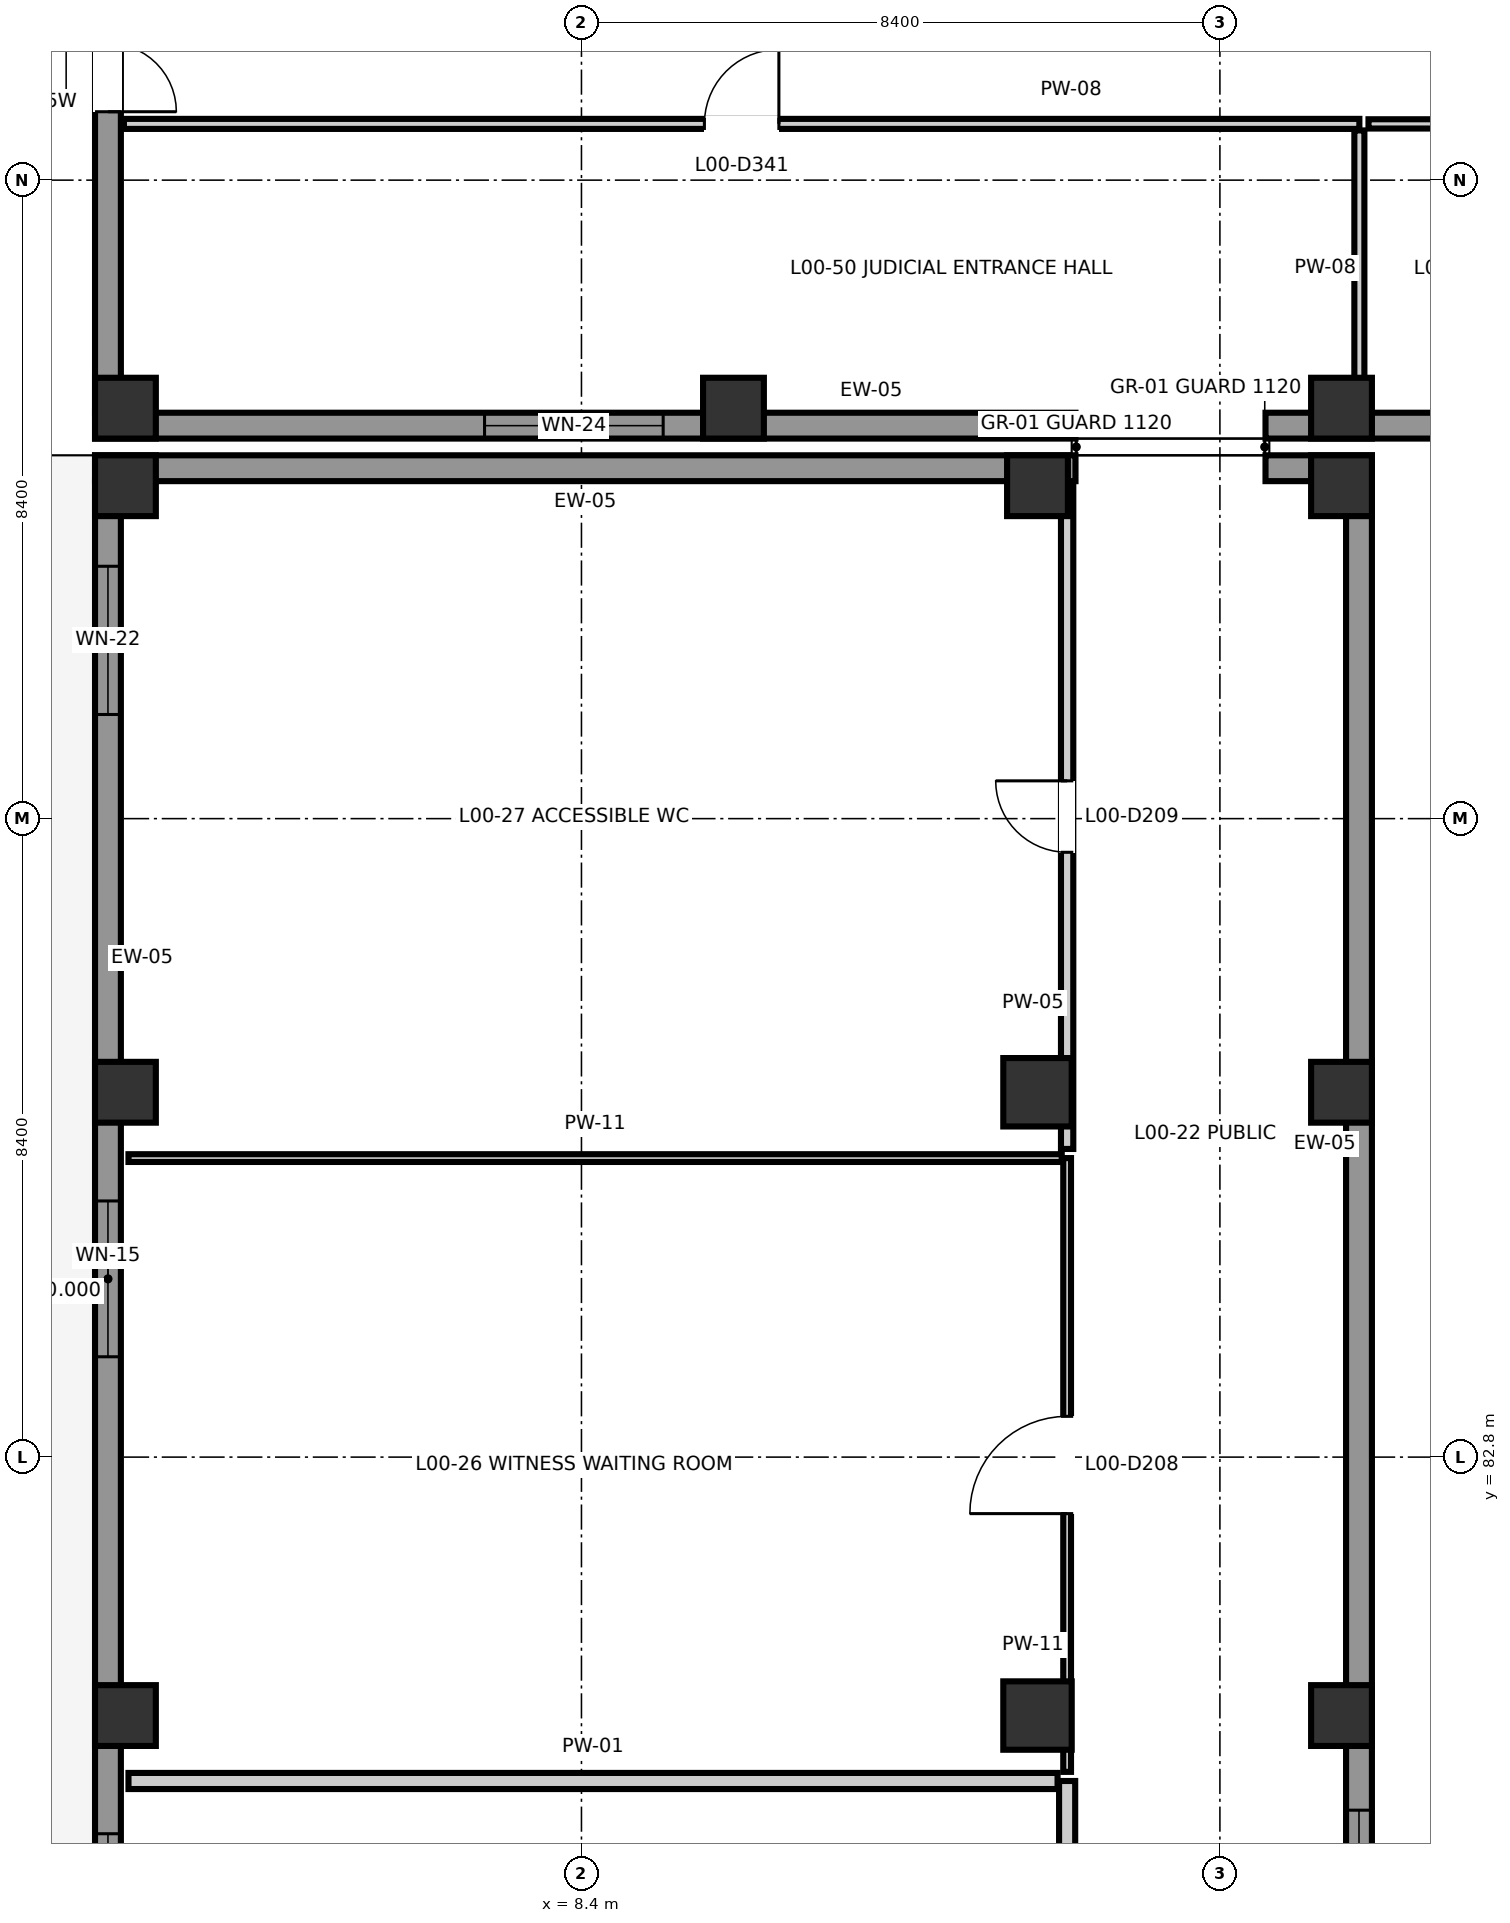
"""IFC4 building model, lengths in metres.
Left out: names, types, materials, properties, quantities, classifications, styles, units other than length and angle.
Written with IfcOpenShell. Run it as: python <this file> out.ifc"""

import sys

from ifc_helpers import new_model, si_unit, direction, frame, frame_2d, origin, origin_2d, place, context, subcontext, project, spatial, rectangle, extrude, element, fill, save


model = new_model("IFC4")
c1 = context("Model", 3, precision=1e-05, world=origin(), true_north=direction((0.0, 1.0)))
c2 = subcontext(c1, "Body", "Model", "MODEL_VIEW")
j1 = project(units=[si_unit("LENGTHUNIT", "METRE"), si_unit("PLANEANGLEUNIT", "RADIAN")], contexts=[c1])
p1 = place(None, origin())
s1 = spatial("IfcSite", under=j1, at=p1, CompositionType="ELEMENT")
p2 = place(p1, origin())
s2 = spatial("IfcBuilding", under=s1, at=p2, CompositionType="ELEMENT")
p3 = place(p2, origin())
s3 = spatial("IfcBuildingStorey", under=s2, at=p3, CompositionType="ELEMENT", Elevation=0.0)
for number, where, z_axis, x_axis in (
    (1, (2.4, 79.4, 0.0), (0.0, 0.0, 1.0), (1.0, 0.0, 0.0)),
    (2, (2.4, 87.6, 0.0), (0.0, 0.0, 1.0), (1.0, 0.0, 0.0)),
    (3, (2.4, 95.58, 0.0), (0.0, 0.0, 1.0), (1.0, 0.0, 0.0)),
):
    element("IfcColumn", number, at=place(p3, frame(where, z_axis=z_axis, x_axis=x_axis)), inside=s3, PredefinedType="COLUMN", context=c2, shape_type="SweptSolid", body=[
        extrude(rectangle(XDim=0.8, YDim=0.8, at=origin_2d()), origin(), (0.0, 0.0, 1.0), 5.4),
    ])
for number, where, z_axis, x_axis in (
    (4, (14.4, 79.4, 0.0), (0.0, 0.0, 1.0), (1.0, 0.0, 0.0)),
    (5, (14.4, 87.6, 0.0), (0.0, 0.0, 1.0), (1.0, 0.0, 0.0)),
):
    element("IfcColumn", number, at=place(p3, frame(where, z_axis=z_axis, x_axis=x_axis)), inside=s3, PredefinedType="COLUMN", context=c2, shape_type="SweptSolid", body=[
        extrude(rectangle(XDim=0.9, YDim=0.9, at=origin_2d()), origin(), (0.0, 0.0, 1.0), 5.4),
    ])
for number, where, z_axis, x_axis in (
    (6, (14.4, 95.58, 0.0), (0.0, 0.0, 1.0), (1.0, 0.0, 0.0)),
    (7, (18.4, 79.4, 0.0), (0.0, 0.0, 1.0), (1.0, 0.0, 0.0)),
    (8, (18.4, 87.6, 0.0), (0.0, 0.0, 1.0), (1.0, 0.0, 0.0)),
    (9, (18.4, 95.58, 0.0), (0.0, 0.0, 1.0), (1.0, 0.0, 0.0)),
    (10, (2.4, 96.6, 0.0), (0.0, 0.0, 1.0), (1.0, 0.0, 0.0)),
    (11, (10.4, 96.6, 0.0), (0.0, 0.0, 1.0), (1.0, 0.0, 0.0)),
    (12, (18.4, 96.6, 0.0), (0.0, 0.0, 1.0), (1.0, 0.0, 0.0)),
):
    element("IfcColumn", number, at=place(p3, frame(where, z_axis=z_axis, x_axis=x_axis)), inside=s3, PredefinedType="COLUMN", context=c2, shape_type="SweptSolid", body=[
        extrude(rectangle(XDim=0.8, YDim=0.8, at=origin_2d()), origin(), (0.0, 0.0, 1.0), 5.4),
    ])
p4 = place(p3, frame((18.63, 41.355, 0.0), z_axis=(0.0, 0.0, 1.0), x_axis=(0.0, 1.0, 0.0)))
e13 = element("IfcWall", 13, at=p4, inside=s3, PredefinedType="SOLIDWALL", context=c2, shape_type="SweptSolid", body=[
    extrude(rectangle(XDim=54.29, YDim=0.34, at=frame_2d((27.145, 0.0))), origin(), (0.0, 0.0, 1.0), 5.1),
])
p5 = place(p4, frame((1.175, 0.0, 0.72)))
e14 = element("IfcOpeningElement", 14, at=p5, cuts=e13, PredefinedType="OPENING", context=c2, shape_type="SweptSolid", body=[
    extrude(rectangle(XDim=1.85, YDim=2.15, at=frame_2d((0.925, 1.075))), frame((0.0, 0.185, 0.0), z_axis=(0.0, -1.0, 0.0), x_axis=(1.0, 0.0, 0.0)), (0.0, 0.0, 1.0), 0.37),
])
p6 = place(p4, frame((34.6, 0.0, 0.72)))
e15 = element("IfcOpeningElement", 15, at=p6, cuts=e13, PredefinedType="OPENING", context=c2, shape_type="SweptSolid", body=[
    extrude(rectangle(XDim=2.2, YDim=2.35, at=frame_2d((1.1, 1.175))), frame((0.0, 0.185, 0.0), z_axis=(0.0, -1.0, 0.0), x_axis=(1.0, 0.0, 0.0)), (0.0, 0.0, 1.0), 0.37),
])
p7 = place(p3, frame((18.8, 95.81, 0.0), z_axis=(0.0, 0.0, 1.0), x_axis=(-1.0, 0.0, 0.0)))
e16 = element("IfcWall", 16, at=p7, inside=s3, PredefinedType="SOLIDWALL", context=c2, shape_type="SweptSolid", body=[
    extrude(rectangle(XDim=1.4, YDim=0.34, at=frame_2d((0.7, 0.0))), origin(), (0.0, 0.0, 1.0), 5.1),
])
p8 = place(p3, frame((14.9, 95.81, 0.0), z_axis=(0.0, 0.0, 1.0), x_axis=(-1.0, 0.0, 0.0)))
e17 = element("IfcWall", 17, at=p8, inside=s3, PredefinedType="SOLIDWALL", context=c2, shape_type="SweptSolid", body=[
    extrude(rectangle(XDim=12.9, YDim=0.34, at=frame_2d((6.45, 0.0))), origin(), (0.0, 0.0, 1.0), 5.1),
])
p9 = place(p3, frame((2.17, 95.645, 0.0), z_axis=(0.0, 0.0, 1.0), x_axis=(0.0, -1.0, 0.0)))
e18 = element("IfcWall", 18, at=p9, inside=s3, PredefinedType="SOLIDWALL", context=c2, shape_type="SweptSolid", body=[
    extrude(rectangle(XDim=54.29, YDim=0.34, at=frame_2d((27.145, 0.0))), origin(), (0.0, 0.0, 1.0), 5.1),
])
p10 = place(p9, frame((47.945, 0.0, 0.0)))
e19 = element("IfcOpeningElement", 19, at=p10, cuts=e18, PredefinedType="OPENING", context=c2, shape_type="SweptSolid", body=[
    extrude(rectangle(XDim=1.2, YDim=2.2, at=frame_2d((0.6, 1.1))), frame((0.0, 0.185, 0.0), z_axis=(0.0, -1.0, 0.0), x_axis=(1.0, 0.0, 0.0)), (0.0, 0.0, 1.0), 0.37),
])
p11 = place(p9, frame((1.125, 0.0, 0.72)))
e20 = element("IfcOpeningElement", 20, at=p11, cuts=e18, PredefinedType="OPENING", context=c2, shape_type="SweptSolid", body=[
    extrude(rectangle(XDim=1.95, YDim=1.95, at=frame_2d((0.975, 0.975))), frame((0.0, 0.185, 0.0), z_axis=(0.0, -1.0, 0.0), x_axis=(1.0, 0.0, 0.0)), (0.0, 0.0, 1.0), 0.37),
])
p12 = place(p9, frame((9.475, 0.0, 0.72)))
e21 = element("IfcOpeningElement", 21, at=p12, cuts=e18, PredefinedType="OPENING", context=c2, shape_type="SweptSolid", body=[
    extrude(rectangle(XDim=2.05, YDim=1.75, at=frame_2d((1.025, 0.875))), frame((0.0, 0.185, 0.0), z_axis=(0.0, -1.0, 0.0), x_axis=(1.0, 0.0, 0.0)), (0.0, 0.0, 1.0), 0.37),
])
p13 = place(p9, frame((17.8, 0.0, 0.72)))
e22 = element("IfcOpeningElement", 22, at=p13, cuts=e18, PredefinedType="OPENING", context=c2, shape_type="SweptSolid", body=[
    extrude(rectangle(XDim=2.2, YDim=1.5, at=frame_2d((1.1, 0.75))), frame((0.0, 0.185, 0.0), z_axis=(0.0, -1.0, 0.0), x_axis=(1.0, 0.0, 0.0)), (0.0, 0.0, 1.0), 0.37),
])
p14 = place(p3, frame((2.0, 96.37, 0.0), z_axis=(0.0, 0.0, 1.0), x_axis=(1.0, 0.0, 0.0)))
e23 = element("IfcWall", 23, at=p14, inside=s3, PredefinedType="SOLIDWALL", context=c2, shape_type="SweptSolid", body=[
    extrude(rectangle(XDim=12.9, YDim=0.34, at=frame_2d((6.45, 0.0))), origin(), (0.0, 0.0, 1.0), 5.1),
])
p15 = place(p14, frame((5.125, 0.0, 0.72)))
e24 = element("IfcOpeningElement", 24, at=p15, cuts=e23, PredefinedType="OPENING", context=c2, shape_type="SweptSolid", body=[
    extrude(rectangle(XDim=2.35, YDim=1.95, at=frame_2d((1.175, 0.975))), frame((0.0, 0.185, 0.0), z_axis=(0.0, -1.0, 0.0), x_axis=(1.0, 0.0, 0.0)), (0.0, 0.0, 1.0), 0.37),
])
p16 = place(p3, frame((17.4, 96.37, 0.0), z_axis=(0.0, 0.0, 1.0), x_axis=(1.0, 0.0, 0.0)))
e25 = element("IfcWall", 25, at=p16, inside=s3, PredefinedType="SOLIDWALL", context=c2, shape_type="SweptSolid", body=[
    extrude(rectangle(XDim=49.4, YDim=0.34, at=frame_2d((24.7, 0.0))), origin(), (0.0, 0.0, 1.0), 5.1),
])
p17 = place(p16, frame((5.1, 0.0, 0.72)))
e26 = element("IfcOpeningElement", 26, at=p17, cuts=e25, PredefinedType="OPENING", context=c2, shape_type="SweptSolid", body=[
    extrude(rectangle(XDim=2.4, YDim=2.35, at=frame_2d((1.2, 1.175))), frame((0.0, 0.185, 0.0), z_axis=(0.0, -1.0, 0.0), x_axis=(1.0, 0.0, 0.0)), (0.0, 0.0, 1.0), 0.37),
])
p18 = place(p16, frame((22.525, 0.0, 0.72)))
e27 = element("IfcOpeningElement", 27, at=p18, cuts=e25, PredefinedType="OPENING", context=c2, shape_type="SweptSolid", body=[
    extrude(rectangle(XDim=1.15, YDim=1.75, at=frame_2d((0.575, 0.875))), frame((0.0, 0.185, 0.0), z_axis=(0.0, -1.0, 0.0), x_axis=(1.0, 0.0, 0.0)), (0.0, 0.0, 1.0), 0.37),
])
p19 = place(p16, frame((30.875, 0.0, 0.72)))
e28 = element("IfcOpeningElement", 28, at=p19, cuts=e25, PredefinedType="OPENING", context=c2, shape_type="SweptSolid", body=[
    extrude(rectangle(XDim=1.25, YDim=2.15, at=frame_2d((0.625, 1.075))), frame((0.0, 0.185, 0.0), z_axis=(0.0, -1.0, 0.0), x_axis=(1.0, 0.0, 0.0)), (0.0, 0.0, 1.0), 0.37),
])
p20 = place(p16, frame((43.4, 0.0, 0.72)))
e29 = element("IfcOpeningElement", 29, at=p20, cuts=e25, PredefinedType="OPENING", context=c2, shape_type="SweptSolid", body=[
    extrude(rectangle(XDim=1.4, YDim=2.15, at=frame_2d((0.7, 1.075))), frame((0.0, 0.185, 0.0), z_axis=(0.0, -1.0, 0.0), x_axis=(1.0, 0.0, 0.0)), (0.0, 0.0, 1.0), 0.37),
])
p21 = place(p3, frame((2.17, 112.665, 0.0), z_axis=(0.0, 0.0, 1.0), x_axis=(0.0, -1.0, 0.0)))
e30 = element("IfcWall", 30, at=p21, inside=s3, PredefinedType="SOLIDWALL", context=c2, shape_type="SweptSolid", body=[
    extrude(rectangle(XDim=16.13, YDim=0.34, at=frame_2d((8.065, 0.0))), origin(), (0.0, 0.0, 1.0), 5.1),
])
p22 = place(p21, frame((10.365, 0.0, 0.0)))
e31 = element("IfcOpeningElement", 31, at=p22, cuts=e30, PredefinedType="OPENING", context=c2, shape_type="SweptSolid", body=[
    extrude(rectangle(XDim=1.8, YDim=2.38, at=frame_2d((0.9, 1.19))), frame((0.0, 0.185, 0.0), z_axis=(0.0, -1.0, 0.0), x_axis=(1.0, 0.0, 0.0)), (0.0, 0.0, 1.0), 0.37),
])
p23 = place(p21, frame((5.625, 0.0, 0.72)))
e32 = element("IfcOpeningElement", 32, at=p23, cuts=e30, PredefinedType="OPENING", context=c2, shape_type="SweptSolid", body=[
    extrude(rectangle(XDim=1.35, YDim=1.95, at=frame_2d((0.675, 0.975))), frame((0.0, 0.185, 0.0), z_axis=(0.0, -1.0, 0.0), x_axis=(1.0, 0.0, 0.0)), (0.0, 0.0, 1.0), 0.37),
])
p24 = place(p3, frame((14.79, 69.639, 0.0), z_axis=(0.0, 0.0, 1.0), x_axis=(0.0, 1.0, 0.0)))
e33 = element("IfcWall", 33, at=p24, inside=s3, PredefinedType="PARTITIONING", context=c2, shape_type="SweptSolid", body=[
    extrude(rectangle(XDim=8.9, YDim=0.212, at=frame_2d((4.45, 0.0))), origin(), (0.0, 0.0, 1.0), 4.33),
])
p25 = place(p24, frame((5.575, 0.0, 0.0)))
e34 = element("IfcOpeningElement", 34, at=p25, cuts=e33, PredefinedType="OPENING", context=c2, shape_type="SweptSolid", body=[
    extrude(rectangle(XDim=0.95, YDim=2.12, at=frame_2d((0.475, 1.06))), frame((0.0, 0.121, 0.0), z_axis=(0.0, -1.0, 0.0), x_axis=(1.0, 0.0, 0.0)), (0.0, 0.0, 1.0), 0.242),
])
p26 = place(p3, frame((2.44, 78.539, 0.0), z_axis=(0.0, 0.0, 1.0), x_axis=(1.0, 0.0, 0.0)))
e35 = element("IfcWall", 35, at=p26, inside=s3, PredefinedType="PARTITIONING", context=c2, shape_type="SweptSolid", body=[
    extrude(rectangle(XDim=12.224, YDim=0.212, at=frame_2d((6.112, 0.0))), origin(), (0.0, 0.0, 1.0), 5.1),
])
p27 = place(p3, frame((14.79, 78.659, 0.0), z_axis=(0.0, 0.0, 1.0), x_axis=(0.0, 1.0, 0.0)))
e36 = element("IfcWall", 36, at=p27, inside=s3, PredefinedType="PARTITIONING", context=c2, shape_type="SweptSolid", body=[
    extrude(rectangle(XDim=8.075, YDim=0.102, at=frame_2d((4.038, 0.0))), origin(), (0.0, 0.0, 1.0), 4.53),
])
p28 = place(p27, frame((3.397, 0.0, 0.0)))
e37 = element("IfcOpeningElement", 37, at=p28, cuts=e36, PredefinedType="OPENING", context=c2, shape_type="SweptSolid", body=[
    extrude(rectangle(XDim=1.28, YDim=2.18, at=frame_2d((0.64, 1.09))), frame((0.0, 0.066, 0.0), z_axis=(0.0, -1.0, 0.0), x_axis=(1.0, 0.0, 0.0)), (0.0, 0.0, 1.0), 0.132),
])
p29 = place(p3, frame((2.44, 86.734, 0.0), z_axis=(0.0, 0.0, 1.0), x_axis=(1.0, 0.0, 0.0)))
e38 = element("IfcWall", 38, at=p29, inside=s3, PredefinedType="PARTITIONING", context=c2, shape_type="SweptSolid", body=[
    extrude(rectangle(XDim=12.279, YDim=0.102, at=frame_2d((6.14, 0.0))), origin(), (0.0, 0.0, 1.0), 5.1),
])
p30 = place(p3, frame((14.79, 86.854, 0.0), z_axis=(0.0, 0.0, 1.0), x_axis=(0.0, 1.0, 0.0)))
e39 = element("IfcWall", 39, at=p30, inside=s3, PredefinedType="PARTITIONING", context=c2, shape_type="SweptSolid", body=[
    extrude(rectangle(XDim=8.746, YDim=0.162, at=frame_2d((4.373, 0.0))), origin(), (0.0, 0.0, 1.0), 5.1),
])
p31 = place(p30, frame((3.903, 0.0, 0.0)))
e40 = element("IfcOpeningElement", 40, at=p31, cuts=e39, PredefinedType="OPENING", context=c2, shape_type="SweptSolid", body=[
    extrude(rectangle(XDim=0.94, YDim=2.07, at=frame_2d((0.47, 1.035))), frame((0.0, 0.096, 0.0), z_axis=(0.0, -1.0, 0.0), x_axis=(1.0, 0.0, 0.0)), (0.0, 0.0, 1.0), 0.192),
])
p32 = place(p3, frame((2.38, 100.34, 0.0), z_axis=(0.0, 0.0, 1.0), x_axis=(1.0, 0.0, 0.0)))
e41 = element("IfcWall", 41, at=p32, inside=s3, PredefinedType="PARTITIONING", context=c2, shape_type="SweptSolid", body=[
    extrude(rectangle(XDim=16.255, YDim=0.132, at=frame_2d((8.127, 0.0))), origin(), (0.0, 0.0, 1.0), 4.43),
])
p33 = place(p32, frame((7.637, 0.0, 0.0)))
e42 = element("IfcOpeningElement", 42, at=p33, cuts=e41, PredefinedType="OPENING", context=c2, shape_type="SweptSolid", body=[
    extrude(rectangle(XDim=0.98, YDim=2.09, at=frame_2d((0.49, 1.045))), frame((0.0, 0.081, 0.0), z_axis=(0.0, -1.0, 0.0), x_axis=(1.0, 0.0, 0.0)), (0.0, 0.0, 1.0), 0.162),
])
p34 = place(p3, frame((18.635, 96.64, 0.0), z_axis=(0.0, 0.0, 1.0), x_axis=(0.0, 1.0, 0.0)))
e43 = element("IfcWall", 43, at=p34, inside=s3, PredefinedType="PARTITIONING", context=c2, shape_type="SweptSolid", body=[
    extrude(rectangle(XDim=3.614, YDim=0.132, at=frame_2d((1.807, 0.0))), origin(), (0.0, 0.0, 1.0), 4.58),
])
p35 = place(p3, frame((18.755, 100.34, 0.0), z_axis=(0.0, 0.0, 1.0), x_axis=(1.0, 0.0, 0.0)))
e44 = element("IfcWall", 44, at=p35, inside=s3, PredefinedType="PARTITIONING", context=c2, shape_type="SweptSolid", body=[
    extrude(rectangle(XDim=15.447, YDim=0.122, at=frame_2d((7.724, 0.0))), origin(), (0.0, 0.0, 1.0), 4.78),
])
p36 = place(p35, frame((7.243, 0.0, 0.0)))
e45 = element("IfcOpeningElement", 45, at=p36, cuts=e44, PredefinedType="OPENING", context=c2, shape_type="SweptSolid", body=[
    extrude(rectangle(XDim=0.96, YDim=2.08, at=frame_2d((0.48, 1.04))), frame((0.0, 0.076, 0.0), z_axis=(0.0, -1.0, 0.0), x_axis=(1.0, 0.0, 0.0)), (0.0, 0.0, 1.0), 0.152),
])
p37 = place(p6, origin())
e46 = element("IfcWindow", 46, at=p37, inside=s3, PartitioningType="SINGLE_PANEL", PredefinedType="WINDOW", context=c2, shape_type="SweptSolid", body=[
    extrude(rectangle(XDim=2.2, YDim=2.35, at=frame_2d((1.1, 1.175))), frame((0.0, 0.03, 0.0), z_axis=(0.0, -1.0, 0.0), x_axis=(1.0, 0.0, 0.0)), (0.0, 0.0, 1.0), 0.06),
])
fill(e15, e46)
p38 = place(p11, origin())
e47 = element("IfcWindow", 47, at=p38, inside=s3, PartitioningType="SINGLE_PANEL", PredefinedType="WINDOW", context=c2, shape_type="SweptSolid", body=[
    extrude(rectangle(XDim=1.95, YDim=1.95, at=frame_2d((0.975, 0.975))), frame((0.0, 0.03, 0.0), z_axis=(0.0, -1.0, 0.0), x_axis=(1.0, 0.0, 0.0)), (0.0, 0.0, 1.0), 0.06),
])
fill(e20, e47)
p39 = place(p12, origin())
e48 = element("IfcWindow", 48, at=p39, inside=s3, PartitioningType="SINGLE_PANEL", PredefinedType="WINDOW", context=c2, shape_type="SweptSolid", body=[
    extrude(rectangle(XDim=2.05, YDim=1.75, at=frame_2d((1.025, 0.875))), frame((0.0, 0.03, 0.0), z_axis=(0.0, -1.0, 0.0), x_axis=(1.0, 0.0, 0.0)), (0.0, 0.0, 1.0), 0.06),
])
fill(e21, e48)
p40 = place(p13, origin())
e49 = element("IfcWindow", 49, at=p40, inside=s3, PartitioningType="SINGLE_PANEL", PredefinedType="WINDOW", context=c2, shape_type="SweptSolid", body=[
    extrude(rectangle(XDim=2.2, YDim=1.5, at=frame_2d((1.1, 0.75))), frame((0.0, 0.03, 0.0), z_axis=(0.0, -1.0, 0.0), x_axis=(1.0, 0.0, 0.0)), (0.0, 0.0, 1.0), 0.06),
])
fill(e22, e49)
p41 = place(p15, origin())
e50 = element("IfcWindow", 50, at=p41, inside=s3, PartitioningType="SINGLE_PANEL", PredefinedType="WINDOW", context=c2, shape_type="SweptSolid", body=[
    extrude(rectangle(XDim=2.35, YDim=1.95, at=frame_2d((1.175, 0.975))), frame((0.0, 0.03, 0.0), z_axis=(0.0, -1.0, 0.0), x_axis=(1.0, 0.0, 0.0)), (0.0, 0.0, 1.0), 0.06),
])
fill(e24, e50)
p42 = place(p22, frame((1.8, 0.0, 0.0), z_axis=(0.0, 0.0, 1.0), x_axis=(-1.0, 0.0, 0.0)))
e51 = element("IfcDoor", 51, at=p42, inside=s3, OperationType="DOUBLE_DOOR_SINGLE_SWING", PredefinedType="DOOR", context=c2, shape_type="SweptSolid", body=[
    extrude(rectangle(XDim=1.8, YDim=2.38, at=frame_2d((0.9, 1.19))), frame((0.0, 0.025, 0.0), z_axis=(0.0, -1.0, 0.0), x_axis=(1.0, 0.0, 0.0)), (0.0, 0.0, 1.0), 0.05),
])
fill(e31, e51)
p43 = place(p28, frame((1.28, 0.0, 0.0), z_axis=(0.0, 0.0, 1.0), x_axis=(-1.0, 0.0, 0.0)))
e52 = element("IfcDoor", 52, at=p43, inside=s3, OperationType="SINGLE_SWING_LEFT", PredefinedType="DOOR", context=c2, shape_type="SweptSolid", body=[
    extrude(rectangle(XDim=1.28, YDim=2.18, at=frame_2d((0.64, 1.09))), frame((0.0, 0.025, 0.0), z_axis=(0.0, -1.0, 0.0), x_axis=(1.0, 0.0, 0.0)), (0.0, 0.0, 1.0), 0.05),
])
fill(e37, e52)
p44 = place(p31, frame((0.94, 0.0, 0.0), z_axis=(0.0, 0.0, 1.0), x_axis=(-1.0, 0.0, 0.0)))
e53 = element("IfcDoor", 53, at=p44, inside=s3, OperationType="SINGLE_SWING_RIGHT", PredefinedType="DOOR", context=c2, shape_type="SweptSolid", body=[
    extrude(rectangle(XDim=0.94, YDim=2.07, at=frame_2d((0.47, 1.035))), frame((0.0, 0.025, 0.0), z_axis=(0.0, -1.0, 0.0), x_axis=(1.0, 0.0, 0.0)), (0.0, 0.0, 1.0), 0.05),
])
fill(e40, e53)
p45 = place(p33, frame((0.98, 0.0, 0.0), z_axis=(0.0, 0.0, 1.0), x_axis=(-1.0, 0.0, 0.0)))
e54 = element("IfcDoor", 54, at=p45, inside=s3, OperationType="SINGLE_SWING_RIGHT", PredefinedType="DOOR", context=c2, shape_type="SweptSolid", body=[
    extrude(rectangle(XDim=0.98, YDim=2.09, at=frame_2d((0.49, 1.045))), frame((0.0, 0.025, 0.0), z_axis=(0.0, -1.0, 0.0), x_axis=(1.0, 0.0, 0.0)), (0.0, 0.0, 1.0), 0.05),
])
fill(e42, e54)
save(model, sys.argv[1])
